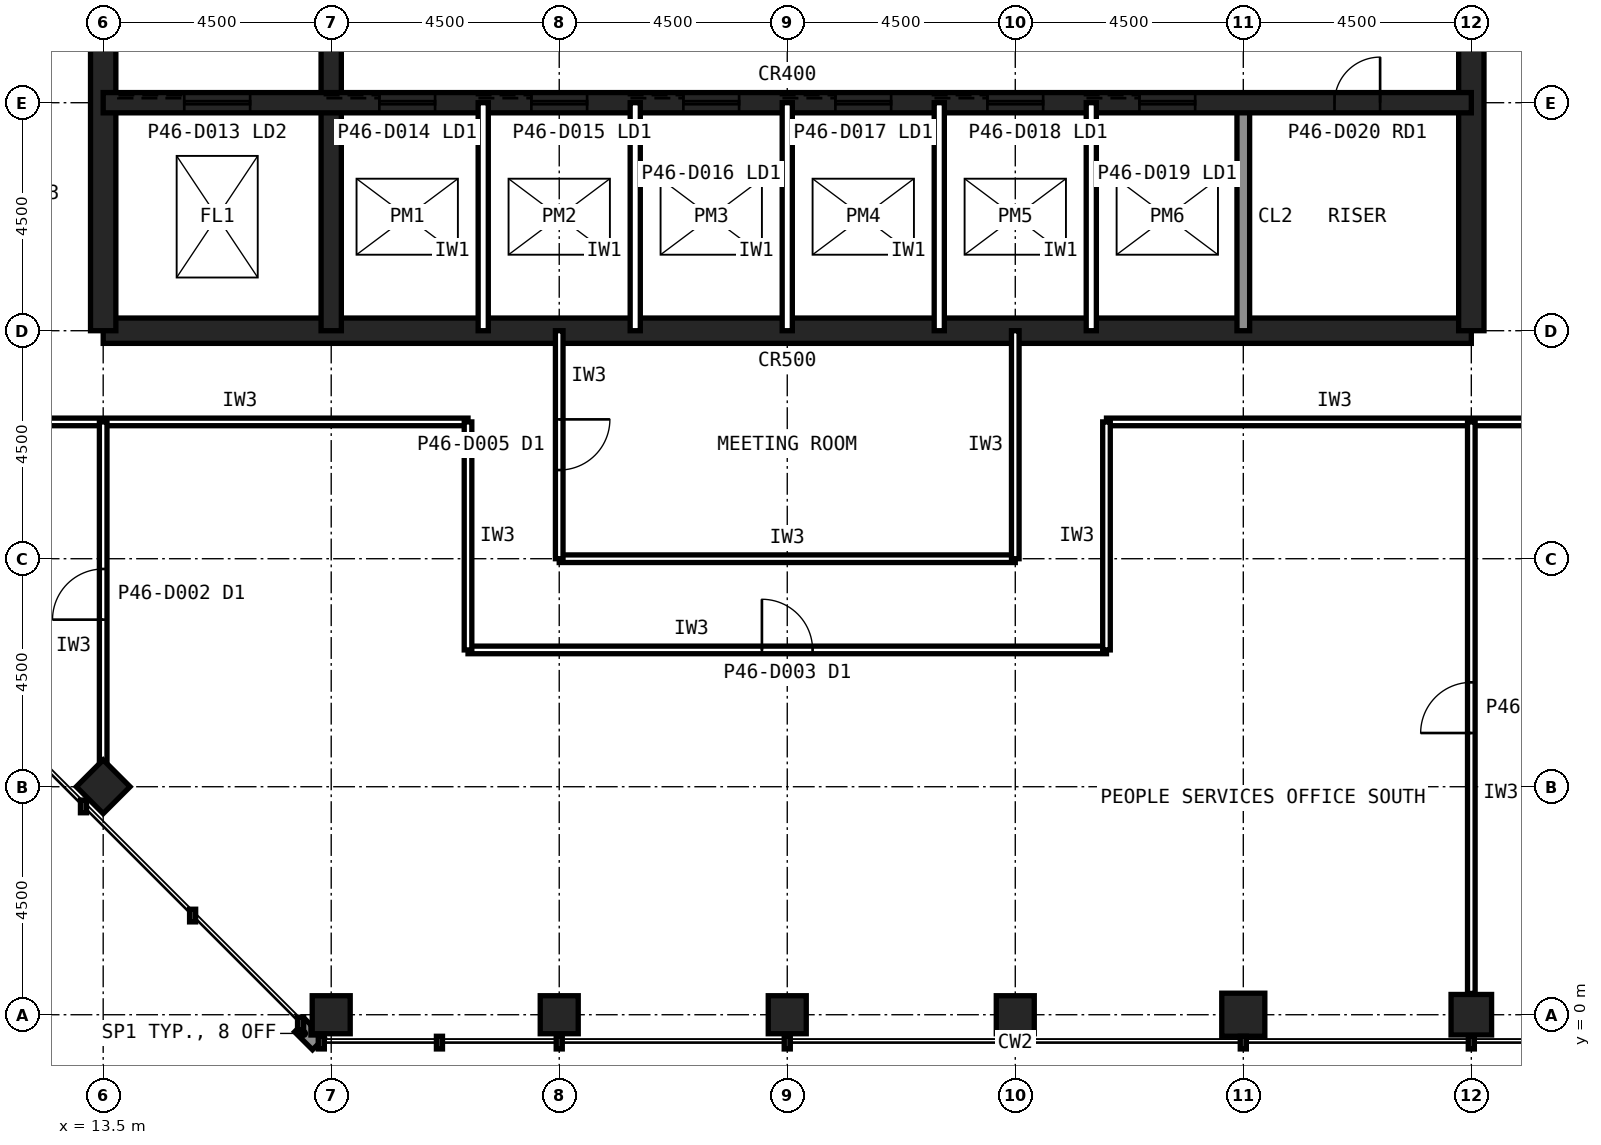
"""IFC4 building model, lengths in metres.
Left out: names, types, materials, properties, quantities, classifications, styles, units other than length and angle.
Written with IfcOpenShell. Run it as: python <this file> out.ifc"""

import sys

from ifc_helpers import new_model, si_unit, direction, frame, frame_2d, origin, origin_2d, place, context, subcontext, project, spatial, rectangle, hollow_rectangle, extrude, element, fill, save


model = new_model("IFC4")
c1 = context("Model", 3, precision=1e-05, world=origin(), true_north=direction((0.0, 1.0)))
c2 = subcontext(c1, "Body", "Model", "MODEL_VIEW")
j1 = project(units=[si_unit("LENGTHUNIT", "METRE"), si_unit("PLANEANGLEUNIT", "RADIAN")], contexts=[c1])
p1 = place(None, origin())
s1 = spatial("IfcSite", under=j1, at=p1, CompositionType="ELEMENT")
p2 = place(p1, origin())
s2 = spatial("IfcBuilding", under=s1, at=p2, CompositionType="ELEMENT")
p3 = place(p2, frame((0.0, 0.0, 191.6)))
s3 = spatial("IfcBuildingStorey", under=s2, at=p3, CompositionType="ELEMENT", Elevation=191.6)
for number, where, z_axis, x_axis in (
    (1, (18.0, 0.0, 0.0), (0.0, 0.0, 1.0), (1.0, 0.0, 0.0)),
    (2, (22.5, 0.0, 0.0), (0.0, 0.0, 1.0), (1.0, 0.0, 0.0)),
    (3, (27.0, 0.0, 0.0), (0.0, 0.0, 1.0), (1.0, 0.0, 0.0)),
    (4, (31.5, 0.0, 0.0), (0.0, 0.0, 1.0), (1.0, 0.0, 0.0)),
):
    element("IfcColumn", number, at=place(p3, frame(where, z_axis=z_axis, x_axis=x_axis)), inside=s3, PredefinedType="COLUMN", context=c2, shape_type="SweptSolid", body=[
        extrude(hollow_rectangle(XDim=0.75, YDim=0.75, WallThickness=0.04, at=origin_2d()), origin(), (0.0, 0.0, 1.0), 4.0),
    ])
p4 = place(p3, frame((36.0, 0.0, 0.0), z_axis=(0.0, 0.0, 1.0), x_axis=(1.0, 0.0, 0.0)))
e5 = element("IfcColumn", 5, at=p4, inside=s3, PredefinedType="COLUMN", context=c2, shape_type="SweptSolid", body=[
    extrude(hollow_rectangle(XDim=0.85, YDim=0.85, WallThickness=0.05, at=origin_2d()), origin(), (0.0, 0.0, 1.0), 4.0),
])
p5 = place(p3, frame((40.5, 0.0, 0.0), z_axis=(0.0, 0.0, 1.0), x_axis=(1.0, 0.0, 0.0)))
e6 = element("IfcColumn", 6, at=p5, inside=s3, PredefinedType="COLUMN", context=c2, shape_type="SweptSolid", body=[
    extrude(hollow_rectangle(XDim=0.8, YDim=0.8, WallThickness=0.045, at=origin_2d()), origin(), (0.0, 0.0, 1.0), 4.0),
])
p6 = place(p3, frame((13.5, 4.5, 0.0), z_axis=(0.0, 0.0, 1.0), x_axis=(0.707106781187, 0.707106781187, 0.0)))
e7 = element("IfcColumn", 7, at=p6, inside=s3, PredefinedType="COLUMN", context=c2, shape_type="SweptSolid", body=[
    extrude(hollow_rectangle(XDim=0.75, YDim=0.75, WallThickness=0.04, at=origin_2d()), origin(), (0.0, 0.0, 1.0), 4.0),
])
p7 = place(p3, frame((13.5, 13.5, 0.0), z_axis=(0.0, 0.0, 1.0), x_axis=(1.0, 0.0, 0.0)))
e8 = element("IfcWall", 8, at=p7, inside=s3, PredefinedType="SHEAR", context=c2, shape_type="SweptSolid", body=[
    extrude(rectangle(XDim=27.0, YDim=0.5, at=frame_2d((13.5, 0.0))), origin(), (0.0, 0.0, 1.0), 4.0),
])
p8 = place(p3, frame((40.5, 13.5, 0.0), z_axis=(0.0, 0.0, 1.0), x_axis=(0.0, 1.0, 0.0)))
e9 = element("IfcWall", 9, at=p8, inside=s3, PredefinedType="SHEAR", context=c2, shape_type="SweptSolid", body=[
    extrude(rectangle(XDim=27.0, YDim=0.5, at=frame_2d((13.5, 0.0))), origin(), (0.0, 0.0, 1.0), 4.0),
])
p9 = place(p8, frame((5.85, 0.0, 0.0)))
e10 = element("IfcOpeningElement", 10, at=p9, cuts=e9, PredefinedType="OPENING", context=c2, shape_type="SweptSolid", body=[
    extrude(rectangle(XDim=1.8, YDim=2.1, at=frame_2d((0.9, 1.05))), frame((0.0, 0.26, 0.0), z_axis=(0.0, -1.0, 0.0), x_axis=(1.0, 0.0, 0.0)), (0.0, 0.0, 1.0), 0.52),
])
p10 = place(p8, frame((19.65, 0.0, 0.0)))
e11 = element("IfcOpeningElement", 11, at=p10, cuts=e9, PredefinedType="OPENING", context=c2, shape_type="SweptSolid", body=[
    extrude(rectangle(XDim=1.2, YDim=2.1, at=frame_2d((0.6, 1.05))), frame((0.0, 0.26, 0.0), z_axis=(0.0, -1.0, 0.0), x_axis=(1.0, 0.0, 0.0)), (0.0, 0.0, 1.0), 0.52),
])
p11 = place(p3, frame((13.5, 40.5, 0.0), z_axis=(0.0, 0.0, 1.0), x_axis=(0.0, -1.0, 0.0)))
e12 = element("IfcWall", 12, at=p11, inside=s3, PredefinedType="SHEAR", context=c2, shape_type="SweptSolid", body=[
    extrude(rectangle(XDim=27.0, YDim=0.5, at=frame_2d((13.5, 0.0))), origin(), (0.0, 0.0, 1.0), 4.0),
])
p12 = place(p11, frame((19.65, 0.0, 0.0)))
e13 = element("IfcOpeningElement", 13, at=p12, cuts=e12, PredefinedType="OPENING", context=c2, shape_type="SweptSolid", body=[
    extrude(rectangle(XDim=1.2, YDim=2.1, at=frame_2d((0.6, 1.05))), frame((0.0, 0.26, 0.0), z_axis=(0.0, -1.0, 0.0), x_axis=(1.0, 0.0, 0.0)), (0.0, 0.0, 1.0), 0.52),
])
p13 = place(p11, frame((5.85, 0.0, 0.0)))
e14 = element("IfcOpeningElement", 14, at=p13, cuts=e12, PredefinedType="OPENING", context=c2, shape_type="SweptSolid", body=[
    extrude(rectangle(XDim=1.8, YDim=2.1, at=frame_2d((0.9, 1.05))), frame((0.0, 0.26, 0.0), z_axis=(0.0, -1.0, 0.0), x_axis=(1.0, 0.0, 0.0)), (0.0, 0.0, 1.0), 0.52),
])
p14 = place(p3, frame((18.0, 13.5, 0.0), z_axis=(0.0, 0.0, 1.0), x_axis=(0.0, 1.0, 0.0)))
e15 = element("IfcWall", 15, at=p14, inside=s3, PredefinedType="SHEAR", context=c2, shape_type="SweptSolid", body=[
    extrude(rectangle(XDim=18.0, YDim=0.4, at=frame_2d((9.0, 0.0))), origin(), (0.0, 0.0, 1.0), 4.0),
])
p15 = place(p3, frame((36.0, 13.5, 0.0), z_axis=(0.0, 0.0, 1.0), x_axis=(0.0, 1.0, 0.0)))
e16 = element("IfcWall", 16, at=p15, inside=s3, PredefinedType="SOLIDWALL", context=c2, shape_type="SweptSolid", body=[
    extrude(rectangle(XDim=4.5, YDim=0.25, at=frame_2d((2.25, 0.0))), origin(), (0.0, 0.0, 1.0), 3.84),
])
p16 = place(p3, frame((13.5, 18.0, 0.0), z_axis=(0.0, 0.0, 1.0), x_axis=(1.0, 0.0, 0.0)))
e17 = element("IfcWall", 17, at=p16, inside=s3, PredefinedType="SHEAR", context=c2, shape_type="SweptSolid", body=[
    extrude(rectangle(XDim=27.0, YDim=0.4, at=frame_2d((13.5, 0.0))), origin(), (0.0, 0.0, 1.0), 4.0),
])
p17 = place(p16, frame((24.3, 0.0, 0.0)))
e18 = element("IfcOpeningElement", 18, at=p17, cuts=e17, PredefinedType="OPENING", context=c2, shape_type="SweptSolid", body=[
    extrude(rectangle(XDim=0.9, YDim=2.1, at=frame_2d((0.45, 1.05))), frame((0.0, 0.21, 0.0), z_axis=(0.0, -1.0, 0.0), x_axis=(1.0, 0.0, 0.0)), (0.0, 0.0, 1.0), 0.42),
])
p18 = place(p16, frame((5.45, 0.0, 0.0)))
e19 = element("IfcOpeningElement", 19, at=p18, cuts=e17, PredefinedType="OPENING", context=c2, shape_type="SweptSolid", body=[
    extrude(rectangle(XDim=1.1, YDim=2.1, at=frame_2d((0.55, 1.05))), frame((0.0, 0.21, 0.0), z_axis=(0.0, -1.0, 0.0), x_axis=(1.0, 0.0, 0.0)), (0.0, 0.0, 1.0), 0.42),
])
p19 = place(p16, frame((8.45, 0.0, 0.0)))
e20 = element("IfcOpeningElement", 20, at=p19, cuts=e17, PredefinedType="OPENING", context=c2, shape_type="SweptSolid", body=[
    extrude(rectangle(XDim=1.1, YDim=2.1, at=frame_2d((0.55, 1.05))), frame((0.0, 0.21, 0.0), z_axis=(0.0, -1.0, 0.0), x_axis=(1.0, 0.0, 0.0)), (0.0, 0.0, 1.0), 0.42),
])
p20 = place(p16, frame((11.45, 0.0, 0.0)))
e21 = element("IfcOpeningElement", 21, at=p20, cuts=e17, PredefinedType="OPENING", context=c2, shape_type="SweptSolid", body=[
    extrude(rectangle(XDim=1.1, YDim=2.1, at=frame_2d((0.55, 1.05))), frame((0.0, 0.21, 0.0), z_axis=(0.0, -1.0, 0.0), x_axis=(1.0, 0.0, 0.0)), (0.0, 0.0, 1.0), 0.42),
])
p21 = place(p16, frame((14.45, 0.0, 0.0)))
e22 = element("IfcOpeningElement", 22, at=p21, cuts=e17, PredefinedType="OPENING", context=c2, shape_type="SweptSolid", body=[
    extrude(rectangle(XDim=1.1, YDim=2.1, at=frame_2d((0.55, 1.05))), frame((0.0, 0.21, 0.0), z_axis=(0.0, -1.0, 0.0), x_axis=(1.0, 0.0, 0.0)), (0.0, 0.0, 1.0), 0.42),
])
p22 = place(p16, frame((17.45, 0.0, 0.0)))
e23 = element("IfcOpeningElement", 23, at=p22, cuts=e17, PredefinedType="OPENING", context=c2, shape_type="SweptSolid", body=[
    extrude(rectangle(XDim=1.1, YDim=2.1, at=frame_2d((0.55, 1.05))), frame((0.0, 0.21, 0.0), z_axis=(0.0, -1.0, 0.0), x_axis=(1.0, 0.0, 0.0)), (0.0, 0.0, 1.0), 0.42),
])
p23 = place(p16, frame((20.45, 0.0, 0.0)))
e24 = element("IfcOpeningElement", 24, at=p23, cuts=e17, PredefinedType="OPENING", context=c2, shape_type="SweptSolid", body=[
    extrude(rectangle(XDim=1.1, YDim=2.1, at=frame_2d((0.55, 1.05))), frame((0.0, 0.21, 0.0), z_axis=(0.0, -1.0, 0.0), x_axis=(1.0, 0.0, 0.0)), (0.0, 0.0, 1.0), 0.42),
])
p24 = place(p16, frame((1.6, 0.0, 0.0)))
e25 = element("IfcOpeningElement", 25, at=p24, cuts=e17, PredefinedType="OPENING", context=c2, shape_type="SweptSolid", body=[
    extrude(rectangle(XDim=1.3, YDim=2.2, at=frame_2d((0.65, 1.1))), frame((0.0, 0.21, 0.0), z_axis=(0.0, -1.0, 0.0), x_axis=(1.0, 0.0, 0.0)), (0.0, 0.0, 1.0), 0.42),
])
for number, where, z_axis, x_axis in (
    (26, (21.0, 13.5, 0.0), (0.0, 0.0, 1.0), (0.0, 1.0, 0.0)),
    (27, (24.0, 13.5, 0.0), (0.0, 0.0, 1.0), (0.0, 1.0, 0.0)),
    (28, (27.0, 13.5, 0.0), (0.0, 0.0, 1.0), (0.0, 1.0, 0.0)),
    (29, (30.0, 13.5, 0.0), (0.0, 0.0, 1.0), (0.0, 1.0, 0.0)),
    (30, (33.0, 13.5, 0.0), (0.0, 0.0, 1.0), (0.0, 1.0, 0.0)),
):
    element("IfcWall", number, at=place(p3, frame(where, z_axis=z_axis, x_axis=x_axis)), inside=s3, PredefinedType="PARTITIONING", context=c2, shape_type="SweptSolid", body=[
        extrude(rectangle(XDim=4.5, YDim=0.2, at=frame_2d((2.25, 0.0))), origin(), (0.0, 0.0, 1.0), 3.84),
    ])
p25 = place(p3, frame((20.7, 7.2, 0.0), z_axis=(0.0, 0.0, 1.0), x_axis=(1.0, 0.0, 0.0)))
e31 = element("IfcWall", 31, at=p25, inside=s3, PredefinedType="PARTITIONING", context=c2, shape_type="SweptSolid", body=[
    extrude(rectangle(XDim=12.6, YDim=0.15, at=frame_2d((6.3, 0.0))), origin(), (0.0, 0.0, 1.0), 3.84),
])
p26 = place(p25, frame((5.8, 0.0, 0.0)))
e32 = element("IfcOpeningElement", 32, at=p26, cuts=e31, PredefinedType="OPENING", context=c2, shape_type="SweptSolid", body=[
    extrude(rectangle(XDim=1.0, YDim=2.1, at=frame_2d((0.5, 1.05))), frame((0.0, 0.085, 0.0), z_axis=(0.0, -1.0, 0.0), x_axis=(1.0, 0.0, 0.0)), (0.0, 0.0, 1.0), 0.17),
])
for number, where, z_axis, x_axis in (
    (33, (11.7, 11.7, 0.0), (0.0, 0.0, 1.0), (1.0, 0.0, 0.0)),
    (34, (33.3, 11.7, 0.0), (0.0, 0.0, 1.0), (1.0, 0.0, 0.0)),
):
    element("IfcWall", number, at=place(p3, frame(where, z_axis=z_axis, x_axis=x_axis)), inside=s3, PredefinedType="PARTITIONING", context=c2, shape_type="SweptSolid", body=[
        extrude(rectangle(XDim=9.0, YDim=0.15, at=frame_2d((4.5, 0.0))), origin(), (0.0, 0.0, 1.0), 3.84),
    ])
for number, where, z_axis, x_axis in (
    (35, (20.7, 11.7, 0.0), (0.0, 0.0, 1.0), (0.0, -1.0, 0.0)),
    (36, (33.3, 7.2, 0.0), (0.0, 0.0, 1.0), (0.0, 1.0, 0.0)),
):
    element("IfcWall", number, at=place(p3, frame(where, z_axis=z_axis, x_axis=x_axis)), inside=s3, PredefinedType="PARTITIONING", context=c2, shape_type="SweptSolid", body=[
        extrude(rectangle(XDim=4.5, YDim=0.15, at=frame_2d((2.25, 0.0))), origin(), (0.0, 0.0, 1.0), 3.84),
    ])
p27 = place(p3, frame((22.5, 9.0, 0.0), z_axis=(0.0, 0.0, 1.0), x_axis=(1.0, 0.0, 0.0)))
e37 = element("IfcWall", 37, at=p27, inside=s3, PredefinedType="PARTITIONING", context=c2, shape_type="SweptSolid", body=[
    extrude(rectangle(XDim=9.0, YDim=0.15, at=frame_2d((4.5, 0.0))), origin(), (0.0, 0.0, 1.0), 3.84),
])
p28 = place(p3, frame((31.5, 9.0, 0.0), z_axis=(0.0, 0.0, 1.0), x_axis=(0.0, 1.0, 0.0)))
e38 = element("IfcWall", 38, at=p28, inside=s3, PredefinedType="PARTITIONING", context=c2, shape_type="SweptSolid", body=[
    extrude(rectangle(XDim=4.5, YDim=0.15, at=frame_2d((2.25, 0.0))), origin(), (0.0, 0.0, 1.0), 2.989),
])
p29 = place(p3, frame((22.5, 13.5, 0.0), z_axis=(0.0, 0.0, 1.0), x_axis=(0.0, -1.0, 0.0)))
e39 = element("IfcWall", 39, at=p29, inside=s3, PredefinedType="PARTITIONING", context=c2, shape_type="SweptSolid", body=[
    extrude(rectangle(XDim=4.5, YDim=0.15, at=frame_2d((2.25, 0.0))), origin(), (0.0, 0.0, 1.0), 2.989),
])
p30 = place(p29, frame((1.75, 0.0, 0.0)))
e40 = element("IfcOpeningElement", 40, at=p30, cuts=e39, PredefinedType="OPENING", context=c2, shape_type="SweptSolid", body=[
    extrude(rectangle(XDim=1.0, YDim=2.1, at=frame_2d((0.5, 1.05))), frame((0.0, 0.085, 0.0), z_axis=(0.0, -1.0, 0.0), x_axis=(1.0, 0.0, 0.0)), (0.0, 0.0, 1.0), 0.17),
])
p31 = place(p3, frame((40.5, 0.42, 0.0), z_axis=(0.0, 0.0, 1.0), x_axis=(0.0, 1.0, 0.0)))
e41 = element("IfcWall", 41, at=p31, inside=s3, PredefinedType="PARTITIONING", context=c2, shape_type="SweptSolid", body=[
    extrude(rectangle(XDim=11.28, YDim=0.15, at=frame_2d((5.64, 0.0))), origin(), (0.0, 0.0, 1.0), 2.989),
])
p32 = place(p31, frame((5.14, 0.0, 0.0)))
e42 = element("IfcOpeningElement", 42, at=p32, cuts=e41, PredefinedType="OPENING", context=c2, shape_type="SweptSolid", body=[
    extrude(rectangle(XDim=1.0, YDim=2.1, at=frame_2d((0.5, 1.05))), frame((0.0, 0.085, 0.0), z_axis=(0.0, -1.0, 0.0), x_axis=(1.0, 0.0, 0.0)), (0.0, 0.0, 1.0), 0.17),
])
p33 = place(p3, frame((13.5, 4.895, 0.0), z_axis=(0.0, 0.0, 1.0), x_axis=(0.0, 1.0, 0.0)))
e43 = element("IfcWall", 43, at=p33, inside=s3, PredefinedType="PARTITIONING", context=c2, shape_type="SweptSolid", body=[
    extrude(rectangle(XDim=6.805, YDim=0.15, at=frame_2d((3.402, 0.0))), origin(), (0.0, 0.0, 1.0), 2.989),
])
p34 = place(p33, frame((2.903, 0.0, 0.0)))
e44 = element("IfcOpeningElement", 44, at=p34, cuts=e43, PredefinedType="OPENING", context=c2, shape_type="SweptSolid", body=[
    extrude(rectangle(XDim=1.0, YDim=2.1, at=frame_2d((0.5, 1.05))), frame((0.0, 0.085, 0.0), z_axis=(0.0, -1.0, 0.0), x_axis=(1.0, 0.0, 0.0)), (0.0, 0.0, 1.0), 0.17),
])
p35 = place(p17, origin())
e45 = element("IfcDoor", 45, at=p35, inside=s3, OperationType="SINGLE_SWING_RIGHT", PredefinedType="DOOR", context=c2, shape_type="SweptSolid", body=[
    extrude(rectangle(XDim=0.9, YDim=2.1, at=frame_2d((0.45, 1.05))), frame((0.0, 0.025, 0.0), z_axis=(0.0, -1.0, 0.0), x_axis=(1.0, 0.0, 0.0)), (0.0, 0.0, 1.0), 0.05),
])
fill(e18, e45)
p36 = place(p18, origin())
e46 = element("IfcDoor", 46, at=p36, inside=s3, OperationType="SLIDING_TO_LEFT", PredefinedType="DOOR", context=c2, shape_type="SweptSolid", body=[
    extrude(rectangle(XDim=1.1, YDim=2.1, at=frame_2d((0.55, 1.05))), frame((0.0, 0.025, 0.0), z_axis=(0.0, -1.0, 0.0), x_axis=(1.0, 0.0, 0.0)), (0.0, 0.0, 1.0), 0.05),
])
fill(e19, e46)
p37 = place(p19, origin())
e47 = element("IfcDoor", 47, at=p37, inside=s3, OperationType="SLIDING_TO_LEFT", PredefinedType="DOOR", context=c2, shape_type="SweptSolid", body=[
    extrude(rectangle(XDim=1.1, YDim=2.1, at=frame_2d((0.55, 1.05))), frame((0.0, 0.025, 0.0), z_axis=(0.0, -1.0, 0.0), x_axis=(1.0, 0.0, 0.0)), (0.0, 0.0, 1.0), 0.05),
])
fill(e20, e47)
p38 = place(p20, origin())
e48 = element("IfcDoor", 48, at=p38, inside=s3, OperationType="SLIDING_TO_LEFT", PredefinedType="DOOR", context=c2, shape_type="SweptSolid", body=[
    extrude(rectangle(XDim=1.1, YDim=2.1, at=frame_2d((0.55, 1.05))), frame((0.0, 0.025, 0.0), z_axis=(0.0, -1.0, 0.0), x_axis=(1.0, 0.0, 0.0)), (0.0, 0.0, 1.0), 0.05),
])
fill(e21, e48)
p39 = place(p21, origin())
e49 = element("IfcDoor", 49, at=p39, inside=s3, OperationType="SLIDING_TO_LEFT", PredefinedType="DOOR", context=c2, shape_type="SweptSolid", body=[
    extrude(rectangle(XDim=1.1, YDim=2.1, at=frame_2d((0.55, 1.05))), frame((0.0, 0.025, 0.0), z_axis=(0.0, -1.0, 0.0), x_axis=(1.0, 0.0, 0.0)), (0.0, 0.0, 1.0), 0.05),
])
fill(e22, e49)
p40 = place(p22, origin())
e50 = element("IfcDoor", 50, at=p40, inside=s3, OperationType="SLIDING_TO_LEFT", PredefinedType="DOOR", context=c2, shape_type="SweptSolid", body=[
    extrude(rectangle(XDim=1.1, YDim=2.1, at=frame_2d((0.55, 1.05))), frame((0.0, 0.025, 0.0), z_axis=(0.0, -1.0, 0.0), x_axis=(1.0, 0.0, 0.0)), (0.0, 0.0, 1.0), 0.05),
])
fill(e23, e50)
p41 = place(p23, origin())
e51 = element("IfcDoor", 51, at=p41, inside=s3, OperationType="SLIDING_TO_LEFT", PredefinedType="DOOR", context=c2, shape_type="SweptSolid", body=[
    extrude(rectangle(XDim=1.1, YDim=2.1, at=frame_2d((0.55, 1.05))), frame((0.0, 0.025, 0.0), z_axis=(0.0, -1.0, 0.0), x_axis=(1.0, 0.0, 0.0)), (0.0, 0.0, 1.0), 0.05),
])
fill(e24, e51)
p42 = place(p24, origin())
e52 = element("IfcDoor", 52, at=p42, inside=s3, OperationType="SLIDING_TO_LEFT", PredefinedType="DOOR", context=c2, shape_type="SweptSolid", body=[
    extrude(rectangle(XDim=1.3, YDim=2.2, at=frame_2d((0.65, 1.1))), frame((0.0, 0.025, 0.0), z_axis=(0.0, -1.0, 0.0), x_axis=(1.0, 0.0, 0.0)), (0.0, 0.0, 1.0), 0.05),
])
fill(e25, e52)
p43 = place(p26, origin())
e53 = element("IfcDoor", 53, at=p43, inside=s3, OperationType="SINGLE_SWING_LEFT", PredefinedType="DOOR", context=c2, shape_type="SweptSolid", body=[
    extrude(rectangle(XDim=1.0, YDim=2.1, at=frame_2d((0.5, 1.05))), frame((0.0, 0.025, 0.0), z_axis=(0.0, -1.0, 0.0), x_axis=(1.0, 0.0, 0.0)), (0.0, 0.0, 1.0), 0.05),
])
fill(e32, e53)
p44 = place(p30, origin())
e54 = element("IfcDoor", 54, at=p44, inside=s3, OperationType="SINGLE_SWING_LEFT", PredefinedType="DOOR", context=c2, shape_type="SweptSolid", body=[
    extrude(rectangle(XDim=1.0, YDim=2.1, at=frame_2d((0.5, 1.05))), frame((0.0, 0.025, 0.0), z_axis=(0.0, -1.0, 0.0), x_axis=(1.0, 0.0, 0.0)), (0.0, 0.0, 1.0), 0.05),
])
fill(e40, e54)
p45 = place(p32, origin())
e55 = element("IfcDoor", 55, at=p45, inside=s3, OperationType="SINGLE_SWING_LEFT", PredefinedType="DOOR", context=c2, shape_type="SweptSolid", body=[
    extrude(rectangle(XDim=1.0, YDim=2.1, at=frame_2d((0.5, 1.05))), frame((0.0, 0.025, 0.0), z_axis=(0.0, -1.0, 0.0), x_axis=(1.0, 0.0, 0.0)), (0.0, 0.0, 1.0), 0.05),
])
fill(e42, e55)
p46 = place(p34, origin())
e56 = element("IfcDoor", 56, at=p46, inside=s3, OperationType="SINGLE_SWING_LEFT", PredefinedType="DOOR", context=c2, shape_type="SweptSolid", body=[
    extrude(rectangle(XDim=1.0, YDim=2.1, at=frame_2d((0.5, 1.05))), frame((0.0, 0.025, 0.0), z_axis=(0.0, -1.0, 0.0), x_axis=(1.0, 0.0, 0.0)), (0.0, 0.0, 1.0), 0.05),
])
fill(e44, e56)
save(model, sys.argv[1])
